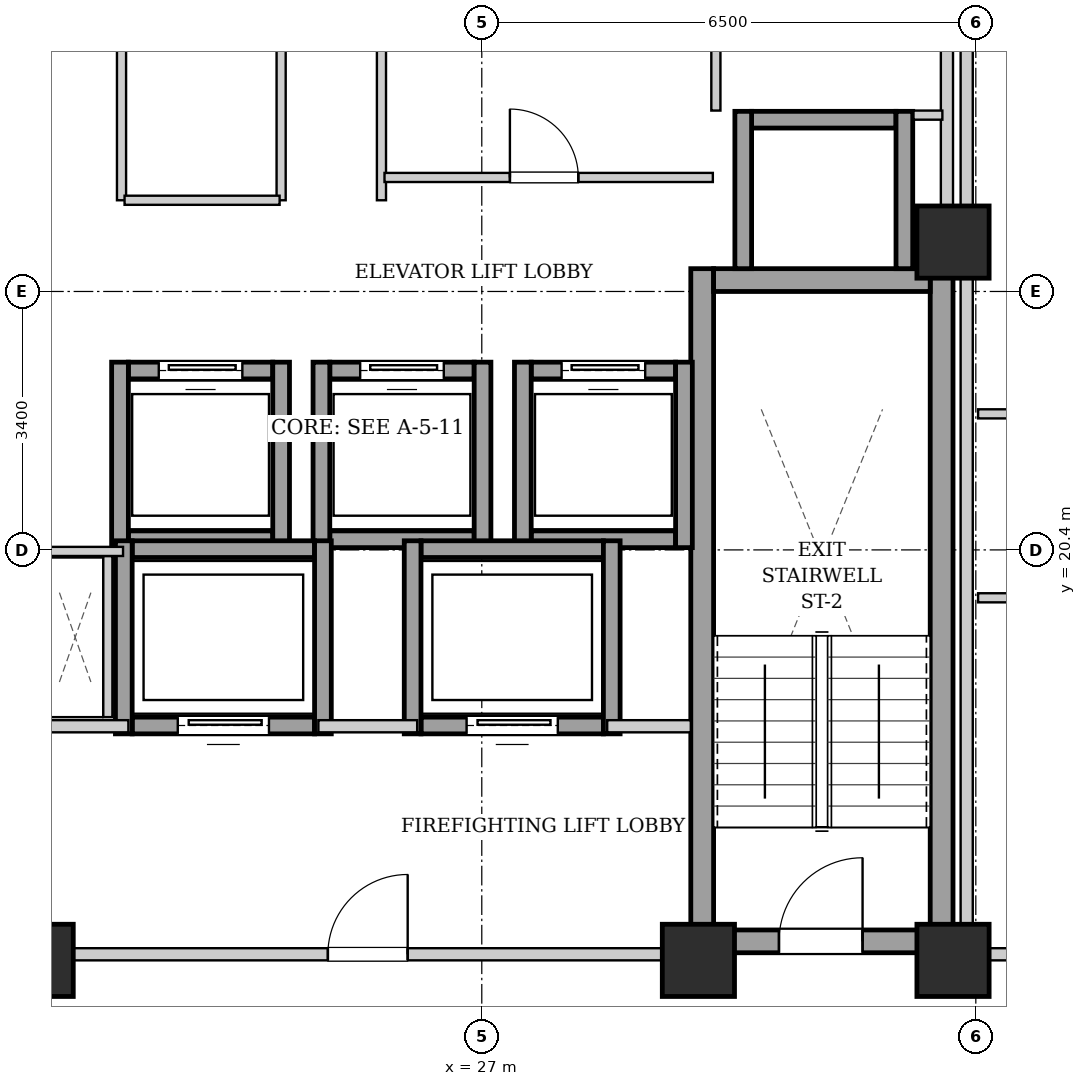
"""IFC4 building model, lengths in metres.
Left out: names, types, materials, properties, quantities, classifications, styles, units other than length and angle.
Written with IfcOpenShell. Run it as: python <this file> out.ifc"""

import sys

from ifc_helpers import new_model, si_unit, direction, frame, frame_2d, origin, origin_2d, place, context, subcontext, project, spatial, rectangle, extrude, element, fill, save


model = new_model("IFC4")
c1 = context("Model", 3, precision=1e-05, world=origin(), true_north=direction((0.0, 1.0)))
c2 = subcontext(c1, "Body", "Model", "MODEL_VIEW")
j1 = project(units=[si_unit("LENGTHUNIT", "METRE"), si_unit("PLANEANGLEUNIT", "RADIAN")], contexts=[c1])
p1 = place(None, origin())
s1 = spatial("IfcSite", under=j1, at=p1, CompositionType="ELEMENT")
p2 = place(p1, origin())
s2 = spatial("IfcBuilding", under=s1, at=p2, CompositionType="ELEMENT")
p3 = place(p2, frame((0.0, 0.0, 143.9)))
s3 = spatial("IfcBuildingStorey", under=s2, at=p3, CompositionType="ELEMENT", Elevation=143.9)
for number, where, z_axis, x_axis in (
    (1, (21.15, 15.0, 0.0), (0.0, 0.0, 1.0), (1.0, 0.0, 0.0)),
    (2, (29.85, 15.0, 0.0), (0.0, 0.0, 1.0), (1.0, 0.0, 0.0)),
    (3, (33.2, 15.0, 0.0), (0.0, 0.0, 1.0), (1.0, 0.0, 0.0)),
    (4, (33.2, 24.45, 0.0), (0.0, 0.0, 1.0), (1.0, 0.0, 0.0)),
):
    element("IfcColumn", number, at=place(p3, frame(where, z_axis=z_axis, x_axis=x_axis)), inside=s3, PredefinedType="COLUMN", context=c2, shape_type="SweptSolid", body=[
        extrude(rectangle(XDim=0.95, YDim=0.95, at=origin_2d()), origin(), (0.0, 0.0, 1.0), 3.25),
    ])
for number, where, z_axis, x_axis in (
    (5, (29.9, 15.1, 0.0), (0.0, 0.0, 1.0), (0.0, 1.0, 0.0)),
    (6, (33.05, 15.1, 0.0), (0.0, 0.0, 1.0), (0.0, 1.0, 0.0)),
):
    element("IfcWall", number, at=place(p3, frame(where, z_axis=z_axis, x_axis=x_axis)), inside=s3, PredefinedType="SHEAR", context=c2, shape_type="SweptSolid", body=[
        extrude(rectangle(XDim=9.0, YDim=0.3, at=frame_2d((4.5, 0.0))), origin(), (0.0, 0.0, 1.0), 2.99),
    ])
p4 = place(p3, frame((30.05, 23.95, 0.0), z_axis=(0.0, 0.0, 1.0), x_axis=(1.0, 0.0, 0.0)))
e7 = element("IfcWall", 7, at=p4, inside=s3, PredefinedType="SHEAR", context=c2, shape_type="SweptSolid", body=[
    extrude(rectangle(XDim=2.85, YDim=0.3, at=frame_2d((1.425, 0.0))), origin(), (0.0, 0.0, 1.0), 2.99),
])
p5 = place(p3, frame((30.05, 15.25, 0.0), z_axis=(0.0, 0.0, 1.0), x_axis=(1.0, 0.0, 0.0)))
e8 = element("IfcWall", 8, at=p5, inside=s3, PredefinedType="SHEAR", context=c2, shape_type="SweptSolid", body=[
    extrude(rectangle(XDim=2.85, YDim=0.3, at=frame_2d((1.425, 0.0))), origin(), (0.0, 0.0, 1.0), 2.99),
])
p6 = place(p5, frame((0.86, 0.0, 0.0)))
e9 = element("IfcOpeningElement", 9, at=p6, cuts=e8, PredefinedType="OPENING", context=c2, shape_type="SweptSolid", body=[
    extrude(rectangle(XDim=1.1, YDim=2.05, at=frame_2d((0.55, 1.025))), frame((0.0, 0.16, 0.0), z_axis=(0.0, -1.0, 0.0), x_axis=(1.0, 0.0, 0.0)), (0.0, 0.0, 1.0), 0.32),
])
p7 = place(p3, frame((22.35, 20.54, 0.0), z_axis=(0.0, 0.0, 1.0), x_axis=(1.0, 0.0, 0.0)))
e10 = element("IfcWall", 10, at=p7, inside=s3, PredefinedType="SHEAR", context=c2, shape_type="SweptSolid", body=[
    extrude(rectangle(XDim=1.9, YDim=0.22, at=frame_2d((0.95, 0.0))), origin(), (0.0, 0.0, 1.0), 2.99),
])
p8 = place(p3, frame((22.35, 22.76, 0.0), z_axis=(0.0, 0.0, 1.0), x_axis=(1.0, 0.0, 0.0)))
e11 = element("IfcWall", 11, at=p8, inside=s3, PredefinedType="SHEAR", context=c2, shape_type="SweptSolid", body=[
    extrude(rectangle(XDim=1.9, YDim=0.22, at=frame_2d((0.95, 0.0))), origin(), (0.0, 0.0, 1.0), 2.99),
])
p9 = place(p8, frame((0.4, 0.0, 0.0)))
e12 = element("IfcOpeningElement", 12, at=p9, cuts=e11, PredefinedType="OPENING", context=c2, shape_type="SweptSolid", body=[
    extrude(rectangle(XDim=1.1, YDim=2.15, at=frame_2d((0.55, 1.075))), frame((0.0, 0.12, 0.0), z_axis=(0.0, -1.0, 0.0), x_axis=(1.0, 0.0, 0.0)), (0.0, 0.0, 1.0), 0.24),
])
for number, where, z_axis, x_axis in (
    (13, (22.24, 20.43, 0.0), (0.0, 0.0, 1.0), (0.0, 1.0, 0.0)),
    (14, (24.36, 20.43, 0.0), (0.0, 0.0, 1.0), (0.0, 1.0, 0.0)),
):
    element("IfcWall", number, at=place(p3, frame(where, z_axis=z_axis, x_axis=x_axis)), inside=s3, PredefinedType="SHEAR", context=c2, shape_type="SweptSolid", body=[
        extrude(rectangle(XDim=2.44, YDim=0.22, at=frame_2d((1.22, 0.0))), origin(), (0.0, 0.0, 1.0), 2.99),
    ])
p10 = place(p3, frame((25.0, 20.54, 0.0), z_axis=(0.0, 0.0, 1.0), x_axis=(1.0, 0.0, 0.0)))
e15 = element("IfcWall", 15, at=p10, inside=s3, PredefinedType="SHEAR", context=c2, shape_type="SweptSolid", body=[
    extrude(rectangle(XDim=1.9, YDim=0.22, at=frame_2d((0.95, 0.0))), origin(), (0.0, 0.0, 1.0), 2.99),
])
p11 = place(p3, frame((25.0, 22.76, 0.0), z_axis=(0.0, 0.0, 1.0), x_axis=(1.0, 0.0, 0.0)))
e16 = element("IfcWall", 16, at=p11, inside=s3, PredefinedType="SHEAR", context=c2, shape_type="SweptSolid", body=[
    extrude(rectangle(XDim=1.9, YDim=0.22, at=frame_2d((0.95, 0.0))), origin(), (0.0, 0.0, 1.0), 2.99),
])
p12 = place(p11, frame((0.4, 0.0, 0.0)))
e17 = element("IfcOpeningElement", 17, at=p12, cuts=e16, PredefinedType="OPENING", context=c2, shape_type="SweptSolid", body=[
    extrude(rectangle(XDim=1.1, YDim=2.15, at=frame_2d((0.55, 1.075))), frame((0.0, 0.12, 0.0), z_axis=(0.0, -1.0, 0.0), x_axis=(1.0, 0.0, 0.0)), (0.0, 0.0, 1.0), 0.24),
])
for number, where, z_axis, x_axis in (
    (18, (24.89, 20.43, 0.0), (0.0, 0.0, 1.0), (0.0, 1.0, 0.0)),
    (19, (27.01, 20.43, 0.0), (0.0, 0.0, 1.0), (0.0, 1.0, 0.0)),
):
    element("IfcWall", number, at=place(p3, frame(where, z_axis=z_axis, x_axis=x_axis)), inside=s3, PredefinedType="SHEAR", context=c2, shape_type="SweptSolid", body=[
        extrude(rectangle(XDim=2.44, YDim=0.22, at=frame_2d((1.22, 0.0))), origin(), (0.0, 0.0, 1.0), 2.99),
    ])
p13 = place(p3, frame((27.65, 20.54, 0.0), z_axis=(0.0, 0.0, 1.0), x_axis=(1.0, 0.0, 0.0)))
e20 = element("IfcWall", 20, at=p13, inside=s3, PredefinedType="SHEAR", context=c2, shape_type="SweptSolid", body=[
    extrude(rectangle(XDim=1.9, YDim=0.22, at=frame_2d((0.95, 0.0))), origin(), (0.0, 0.0, 1.0), 2.99),
])
p14 = place(p3, frame((27.65, 22.76, 0.0), z_axis=(0.0, 0.0, 1.0), x_axis=(1.0, 0.0, 0.0)))
e21 = element("IfcWall", 21, at=p14, inside=s3, PredefinedType="SHEAR", context=c2, shape_type="SweptSolid", body=[
    extrude(rectangle(XDim=1.9, YDim=0.22, at=frame_2d((0.95, 0.0))), origin(), (0.0, 0.0, 1.0), 2.99),
])
p15 = place(p14, frame((0.4, 0.0, 0.0)))
e22 = element("IfcOpeningElement", 22, at=p15, cuts=e21, PredefinedType="OPENING", context=c2, shape_type="SweptSolid", body=[
    extrude(rectangle(XDim=1.1, YDim=2.15, at=frame_2d((0.55, 1.075))), frame((0.0, 0.12, 0.0), z_axis=(0.0, -1.0, 0.0), x_axis=(1.0, 0.0, 0.0)), (0.0, 0.0, 1.0), 0.24),
])
for number, where, z_axis, x_axis in (
    (23, (27.54, 20.43, 0.0), (0.0, 0.0, 1.0), (0.0, 1.0, 0.0)),
    (24, (29.66, 20.43, 0.0), (0.0, 0.0, 1.0), (0.0, 1.0, 0.0)),
):
    element("IfcWall", number, at=place(p3, frame(where, z_axis=z_axis, x_axis=x_axis)), inside=s3, PredefinedType="SHEAR", context=c2, shape_type="SweptSolid", body=[
        extrude(rectangle(XDim=2.44, YDim=0.22, at=frame_2d((1.22, 0.0))), origin(), (0.0, 0.0, 1.0), 2.99),
    ])
p16 = place(p3, frame((30.55, 26.06, 0.0), z_axis=(0.0, 0.0, 1.0), x_axis=(1.0, 0.0, 0.0)))
e25 = element("IfcWall", 25, at=p16, inside=s3, PredefinedType="SHEAR", context=c2, shape_type="SweptSolid", body=[
    extrude(rectangle(XDim=1.9, YDim=0.22, at=frame_2d((0.95, 0.0))), origin(), (0.0, 0.0, 1.0), 2.99),
])
for number, where, z_axis, x_axis in (
    (26, (30.44, 24.1, 0.0), (0.0, 0.0, 1.0), (0.0, 1.0, 0.0)),
    (27, (32.56, 24.1, 0.0), (0.0, 0.0, 1.0), (0.0, 1.0, 0.0)),
):
    element("IfcWall", number, at=place(p3, frame(where, z_axis=z_axis, x_axis=x_axis)), inside=s3, PredefinedType="SHEAR", context=c2, shape_type="SweptSolid", body=[
        extrude(rectangle(XDim=2.07, YDim=0.22, at=frame_2d((1.035, 0.0))), origin(), (0.0, 0.0, 1.0), 2.99),
    ])
p17 = place(p3, frame((22.4, 18.09, 0.0), z_axis=(0.0, 0.0, 1.0), x_axis=(1.0, 0.0, 0.0)))
e28 = element("IfcWall", 28, at=p17, inside=s3, PredefinedType="SHEAR", context=c2, shape_type="SweptSolid", body=[
    extrude(rectangle(XDim=2.4, YDim=0.22, at=frame_2d((1.2, 0.0))), origin(), (0.0, 0.0, 1.0), 2.99),
])
p18 = place(p17, frame((0.6, 0.0, 0.0)))
e29 = element("IfcOpeningElement", 29, at=p18, cuts=e28, PredefinedType="OPENING", context=c2, shape_type="SweptSolid", body=[
    extrude(rectangle(XDim=1.2, YDim=2.15, at=frame_2d((0.6, 1.075))), frame((0.0, 0.12, 0.0), z_axis=(0.0, -1.0, 0.0), x_axis=(1.0, 0.0, 0.0)), (0.0, 0.0, 1.0), 0.24),
])
p19 = place(p3, frame((22.4, 20.41, 0.0), z_axis=(0.0, 0.0, 1.0), x_axis=(1.0, 0.0, 0.0)))
e30 = element("IfcWall", 30, at=p19, inside=s3, PredefinedType="SHEAR", context=c2, shape_type="SweptSolid", body=[
    extrude(rectangle(XDim=2.4, YDim=0.22, at=frame_2d((1.2, 0.0))), origin(), (0.0, 0.0, 1.0), 2.99),
])
for number, where, z_axis, x_axis in (
    (31, (22.29, 17.98, 0.0), (0.0, 0.0, 1.0), (0.0, 1.0, 0.0)),
    (32, (24.91, 17.98, 0.0), (0.0, 0.0, 1.0), (0.0, 1.0, 0.0)),
):
    element("IfcWall", number, at=place(p3, frame(where, z_axis=z_axis, x_axis=x_axis)), inside=s3, PredefinedType="SHEAR", context=c2, shape_type="SweptSolid", body=[
        extrude(rectangle(XDim=2.54, YDim=0.22, at=frame_2d((1.27, 0.0))), origin(), (0.0, 0.0, 1.0), 2.99),
    ])
p20 = place(p3, frame((26.2, 18.09, 0.0), z_axis=(0.0, 0.0, 1.0), x_axis=(1.0, 0.0, 0.0)))
e33 = element("IfcWall", 33, at=p20, inside=s3, PredefinedType="SHEAR", context=c2, shape_type="SweptSolid", body=[
    extrude(rectangle(XDim=2.4, YDim=0.22, at=frame_2d((1.2, 0.0))), origin(), (0.0, 0.0, 1.0), 2.99),
])
p21 = place(p20, frame((0.6, 0.0, 0.0)))
e34 = element("IfcOpeningElement", 34, at=p21, cuts=e33, PredefinedType="OPENING", context=c2, shape_type="SweptSolid", body=[
    extrude(rectangle(XDim=1.2, YDim=2.15, at=frame_2d((0.6, 1.075))), frame((0.0, 0.12, 0.0), z_axis=(0.0, -1.0, 0.0), x_axis=(1.0, 0.0, 0.0)), (0.0, 0.0, 1.0), 0.24),
])
p22 = place(p3, frame((26.2, 20.41, 0.0), z_axis=(0.0, 0.0, 1.0), x_axis=(1.0, 0.0, 0.0)))
e35 = element("IfcWall", 35, at=p22, inside=s3, PredefinedType="SHEAR", context=c2, shape_type="SweptSolid", body=[
    extrude(rectangle(XDim=2.4, YDim=0.22, at=frame_2d((1.2, 0.0))), origin(), (0.0, 0.0, 1.0), 2.99),
])
for number, where, z_axis, x_axis in (
    (36, (26.09, 17.98, 0.0), (0.0, 0.0, 1.0), (0.0, 1.0, 0.0)),
    (37, (28.71, 17.98, 0.0), (0.0, 0.0, 1.0), (0.0, 1.0, 0.0)),
):
    element("IfcWall", number, at=place(p3, frame(where, z_axis=z_axis, x_axis=x_axis)), inside=s3, PredefinedType="SHEAR", context=c2, shape_type="SweptSolid", body=[
        extrude(rectangle(XDim=2.54, YDim=0.22, at=frame_2d((1.27, 0.0))), origin(), (0.0, 0.0, 1.0), 2.99),
    ])
p23 = place(p3, frame((21.25, 15.08, 0.0), z_axis=(0.0, 0.0, 1.0), x_axis=(1.0, 0.0, 0.0)))
e38 = element("IfcWall", 38, at=p23, inside=s3, PredefinedType="PARTITIONING", context=c2, shape_type="SweptSolid", body=[
    extrude(rectangle(XDim=8.5, YDim=0.16, at=frame_2d((4.25, 0.0))), origin(), (0.0, 0.0, 1.0), 2.426),
])
p24 = place(p23, frame((3.725, 0.0, 0.0)))
e39 = element("IfcOpeningElement", 39, at=p24, cuts=e38, PredefinedType="OPENING", context=c2, shape_type="SweptSolid", body=[
    extrude(rectangle(XDim=1.05, YDim=2.05, at=frame_2d((0.525, 1.025))), frame((0.0, 0.09, 0.0), z_axis=(0.0, -1.0, 0.0), x_axis=(1.0, 0.0, 0.0)), (0.0, 0.0, 1.0), 0.18),
])
p25 = place(p3, frame((21.25, 18.08, 0.0), z_axis=(0.0, 0.0, 1.0), x_axis=(1.0, 0.0, 0.0)))
e40 = element("IfcWall", 40, at=p25, inside=s3, PredefinedType="PARTITIONING", context=c2, shape_type="SweptSolid", body=[
    extrude(rectangle(XDim=1.1, YDim=0.16, at=frame_2d((0.55, 0.0))), origin(), (0.0, 0.0, 1.0), 2.99),
])
p26 = place(p3, frame((24.85, 18.08, 0.0), z_axis=(0.0, 0.0, 1.0), x_axis=(1.0, 0.0, 0.0)))
e41 = element("IfcWall", 41, at=p26, inside=s3, PredefinedType="PARTITIONING", context=c2, shape_type="SweptSolid", body=[
    extrude(rectangle(XDim=1.3, YDim=0.16, at=frame_2d((0.65, 0.0))), origin(), (0.0, 0.0, 1.0), 2.99),
])
p27 = place(p3, frame((28.65, 18.08, 0.0), z_axis=(0.0, 0.0, 1.0), x_axis=(1.0, 0.0, 0.0)))
e42 = element("IfcWall", 42, at=p27, inside=s3, PredefinedType="PARTITIONING", context=c2, shape_type="SweptSolid", body=[
    extrude(rectangle(XDim=1.1, YDim=0.16, at=frame_2d((0.55, 0.0))), origin(), (0.0, 0.0, 1.0), 2.99),
])
p28 = place(p3, frame((33.12, 24.12, 0.0), z_axis=(0.0, 0.0, 1.0), x_axis=(0.0, 1.0, 0.0)))
e43 = element("IfcWall", 43, at=p28, inside=s3, PredefinedType="PARTITIONING", context=c2, shape_type="SweptSolid", body=[
    extrude(rectangle(XDim=4.76, YDim=0.16, at=frame_2d((2.38, 0.0))), origin(), (0.0, 0.0, 1.0), 2.99),
])
p29 = place(p3, frame((22.08, 18.2, 0.0), z_axis=(0.0, 0.0, 1.0), x_axis=(0.0, 1.0, 0.0)))
e44 = element("IfcWall", 44, at=p29, inside=s3, PredefinedType="PARTITIONING", context=c2, shape_type="SweptSolid", body=[
    extrude(rectangle(XDim=2.12, YDim=0.12, at=frame_2d((1.06, 0.0))), origin(), (0.0, 0.0, 1.0), 2.99),
])
p30 = place(p3, frame((22.28, 20.38, 0.0), z_axis=(0.0, 0.0, 1.0), x_axis=(-1.0, 0.0, 0.0)))
e45 = element("IfcWall", 45, at=p30, inside=s3, PredefinedType="PARTITIONING", context=c2, shape_type="SweptSolid", body=[
    extrude(rectangle(XDim=1.02, YDim=0.12, at=frame_2d((0.51, 0.0))), origin(), (0.0, 0.0, 1.0), 2.99),
])
for number, where, z_axis, x_axis in (
    (46, (24.36, 25.0, 0.0), (0.0, 0.0, 1.0), (0.0, 1.0, 0.0)),
    (47, (25.68, 25.0, 0.0), (0.0, 0.0, 1.0), (0.0, 1.0, 0.0)),
):
    element("IfcWall", number, at=place(p3, frame(where, z_axis=z_axis, x_axis=x_axis)), inside=s3, PredefinedType="PARTITIONING", context=c2, shape_type="SweptSolid", body=[
        extrude(rectangle(XDim=3.87, YDim=0.12, at=frame_2d((1.935, 0.0))), origin(), (0.0, 0.0, 1.0), 2.99),
    ])
p31 = place(p3, frame((30.08, 26.18, 0.0), z_axis=(0.0, 0.0, 1.0), x_axis=(0.0, 1.0, 0.0)))
e48 = element("IfcWall", 48, at=p31, inside=s3, PredefinedType="PARTITIONING", context=c2, shape_type="SweptSolid", body=[
    extrude(rectangle(XDim=2.68, YDim=0.12, at=frame_2d((1.34, 0.0))), origin(), (0.0, 0.0, 1.0), 2.99),
])
p32 = place(p3, frame((32.68, 26.12, 0.0), z_axis=(0.0, 0.0, 1.0), x_axis=(1.0, 0.0, 0.0)))
e49 = element("IfcWall", 49, at=p32, inside=s3, PredefinedType="PARTITIONING", context=c2, shape_type="SweptSolid", body=[
    extrude(rectangle(XDim=0.38, YDim=0.12, at=frame_2d((0.19, 0.0))), origin(), (0.0, 0.0, 1.0), 2.99),
])
p33 = place(p3, frame((22.26, 25.0, 0.0), z_axis=(0.0, 0.0, 1.0), x_axis=(0.0, 1.0, 0.0)))
e50 = element("IfcWall", 50, at=p33, inside=s3, PredefinedType="PARTITIONING", context=c2, shape_type="SweptSolid", body=[
    extrude(rectangle(XDim=3.86, YDim=0.12, at=frame_2d((1.93, 0.0))), origin(), (0.0, 0.0, 1.0), 2.99),
])
p34 = place(p3, frame((22.3, 25.0, 0.0), z_axis=(0.0, 0.0, 1.0), x_axis=(1.0, 0.0, 0.0)))
e51 = element("IfcWall", 51, at=p34, inside=s3, PredefinedType="PARTITIONING", context=c2, shape_type="SweptSolid", body=[
    extrude(rectangle(XDim=2.04, YDim=0.12, at=frame_2d((1.02, 0.0))), origin(), (0.0, 0.0, 1.0), 2.99),
])
p35 = place(p3, frame((25.72, 25.3, 0.0), z_axis=(0.0, 0.0, 1.0), x_axis=(1.0, 0.0, 0.0)))
e52 = element("IfcWall", 52, at=p35, inside=s3, PredefinedType="PARTITIONING", context=c2, shape_type="SweptSolid", body=[
    extrude(rectangle(XDim=4.32, YDim=0.12, at=frame_2d((2.16, 0.0))), origin(), (0.0, 0.0, 1.0), 2.99),
])
p36 = place(p35, frame((1.65, 0.0, 0.0)))
e53 = element("IfcOpeningElement", 53, at=p36, cuts=e52, PredefinedType="OPENING", context=c2, shape_type="SweptSolid", body=[
    extrude(rectangle(XDim=0.9, YDim=2.05, at=frame_2d((0.45, 1.025))), frame((0.0, 0.07, 0.0), z_axis=(0.0, -1.0, 0.0), x_axis=(1.0, 0.0, 0.0)), (0.0, 0.0, 1.0), 0.14),
])
p37 = place(p3, frame((33.38, 15.08, 0.0), z_axis=(0.0, 0.0, 1.0), x_axis=(1.0, 0.0, 0.0)))
e54 = element("IfcWall", 54, at=p37, inside=s3, PredefinedType="PARTITIONING", context=c2, shape_type="SweptSolid", body=[
    extrude(rectangle(XDim=6.64, YDim=0.16, at=frame_2d((3.32, 0.0))), origin(), (0.0, 0.0, 1.0), 2.426),
])
p38 = place(p37, frame((0.9, 0.0, 0.0)))
e55 = element("IfcOpeningElement", 55, at=p38, cuts=e54, PredefinedType="OPENING", context=c2, shape_type="SweptSolid", body=[
    extrude(rectangle(XDim=0.95, YDim=2.1, at=frame_2d((0.475, 1.05))), frame((0.0, 0.09, 0.0), z_axis=(0.0, -1.0, 0.0), x_axis=(1.0, 0.0, 0.0)), (0.0, 0.0, 1.0), 0.18),
])
p39 = place(p3, frame((33.53, 22.19, 0.0), z_axis=(0.0, 0.0, 1.0), x_axis=(1.0, 0.0, 0.0)))
e56 = element("IfcWall", 56, at=p39, inside=s3, PredefinedType="PARTITIONING", context=c2, shape_type="SweptSolid", body=[
    extrude(rectangle(XDim=2.45, YDim=0.12, at=frame_2d((1.225, 0.0))), origin(), (0.0, 0.0, 1.0), 2.99),
])
p40 = place(p3, frame((33.53, 19.77, 0.0), z_axis=(0.0, 0.0, 1.0), x_axis=(1.0, 0.0, 0.0)))
e57 = element("IfcWall", 57, at=p40, inside=s3, PredefinedType="PARTITIONING", context=c2, shape_type="SweptSolid", body=[
    extrude(rectangle(XDim=2.45, YDim=0.12, at=frame_2d((1.225, 0.0))), origin(), (0.0, 0.0, 1.0), 2.99),
])
p41 = place(p40, frame((0.795, 0.0, 0.0)))
e58 = element("IfcOpeningElement", 58, at=p41, cuts=e57, PredefinedType="OPENING", context=c2, shape_type="SweptSolid", body=[
    extrude(rectangle(XDim=0.86, YDim=2.05, at=frame_2d((0.43, 1.025))), frame((0.0, 0.07, 0.0), z_axis=(0.0, -1.0, 0.0), x_axis=(1.0, 0.0, 0.0)), (0.0, 0.0, 1.0), 0.14),
])
p42 = place(p3, frame((33.38, 15.02, 0.0), z_axis=(0.0, 0.0, 1.0), x_axis=(0.0, 1.0, 0.0)))
e59 = element("IfcWall", 59, at=p42, inside=s3, PredefinedType="PARTITIONING", context=c2, shape_type="SweptSolid", body=[
    extrude(rectangle(XDim=13.98, YDim=0.16, at=frame_2d((6.99, 0.0))), origin(), (0.0, 0.0, 1.0), 2.99),
])
p43 = place(p6, origin())
e60 = element("IfcDoor", 60, at=p43, inside=s3, OperationType="SINGLE_SWING_RIGHT", PredefinedType="DOOR", context=c2, shape_type="SweptSolid", body=[
    extrude(rectangle(XDim=1.1, YDim=2.05, at=frame_2d((0.55, 1.025))), frame((0.0, 0.025, 0.0), z_axis=(0.0, -1.0, 0.0), x_axis=(1.0, 0.0, 0.0)), (0.0, 0.0, 1.0), 0.05),
])
fill(e9, e60)
p44 = place(p9, origin())
e61 = element("IfcDoor", 61, at=p44, inside=s3, OperationType="SLIDING_TO_LEFT", PredefinedType="DOOR", context=c2, shape_type="SweptSolid", body=[
    extrude(rectangle(XDim=1.1, YDim=2.15, at=frame_2d((0.55, 1.075))), frame((0.0, 0.025, 0.0), z_axis=(0.0, -1.0, 0.0), x_axis=(1.0, 0.0, 0.0)), (0.0, 0.0, 1.0), 0.05),
])
fill(e12, e61)
p45 = place(p12, origin())
e62 = element("IfcDoor", 62, at=p45, inside=s3, OperationType="SLIDING_TO_LEFT", PredefinedType="DOOR", context=c2, shape_type="SweptSolid", body=[
    extrude(rectangle(XDim=1.1, YDim=2.15, at=frame_2d((0.55, 1.075))), frame((0.0, 0.025, 0.0), z_axis=(0.0, -1.0, 0.0), x_axis=(1.0, 0.0, 0.0)), (0.0, 0.0, 1.0), 0.05),
])
fill(e17, e62)
p46 = place(p15, origin())
e63 = element("IfcDoor", 63, at=p46, inside=s3, OperationType="SLIDING_TO_LEFT", PredefinedType="DOOR", context=c2, shape_type="SweptSolid", body=[
    extrude(rectangle(XDim=1.1, YDim=2.15, at=frame_2d((0.55, 1.075))), frame((0.0, 0.025, 0.0), z_axis=(0.0, -1.0, 0.0), x_axis=(1.0, 0.0, 0.0)), (0.0, 0.0, 1.0), 0.05),
])
fill(e22, e63)
p47 = place(p18, origin())
e64 = element("IfcDoor", 64, at=p47, inside=s3, OperationType="SLIDING_TO_LEFT", PredefinedType="DOOR", context=c2, shape_type="SweptSolid", body=[
    extrude(rectangle(XDim=1.2, YDim=2.15, at=frame_2d((0.6, 1.075))), frame((0.0, 0.025, 0.0), z_axis=(0.0, -1.0, 0.0), x_axis=(1.0, 0.0, 0.0)), (0.0, 0.0, 1.0), 0.05),
])
fill(e29, e64)
p48 = place(p21, origin())
e65 = element("IfcDoor", 65, at=p48, inside=s3, OperationType="SLIDING_TO_LEFT", PredefinedType="DOOR", context=c2, shape_type="SweptSolid", body=[
    extrude(rectangle(XDim=1.2, YDim=2.15, at=frame_2d((0.6, 1.075))), frame((0.0, 0.025, 0.0), z_axis=(0.0, -1.0, 0.0), x_axis=(1.0, 0.0, 0.0)), (0.0, 0.0, 1.0), 0.05),
])
fill(e34, e65)
p49 = place(p24, origin())
e66 = element("IfcDoor", 66, at=p49, inside=s3, OperationType="SINGLE_SWING_RIGHT", PredefinedType="DOOR", context=c2, shape_type="SweptSolid", body=[
    extrude(rectangle(XDim=1.05, YDim=2.05, at=frame_2d((0.525, 1.025))), frame((0.0, 0.025, 0.0), z_axis=(0.0, -1.0, 0.0), x_axis=(1.0, 0.0, 0.0)), (0.0, 0.0, 1.0), 0.05),
])
fill(e39, e66)
p50 = place(p36, origin())
e67 = element("IfcDoor", 67, at=p50, inside=s3, OperationType="SINGLE_SWING_LEFT", PredefinedType="DOOR", context=c2, shape_type="SweptSolid", body=[
    extrude(rectangle(XDim=0.9, YDim=2.05, at=frame_2d((0.45, 1.025))), frame((0.0, 0.025, 0.0), z_axis=(0.0, -1.0, 0.0), x_axis=(1.0, 0.0, 0.0)), (0.0, 0.0, 1.0), 0.05),
])
fill(e53, e67)
save(model, sys.argv[1])
